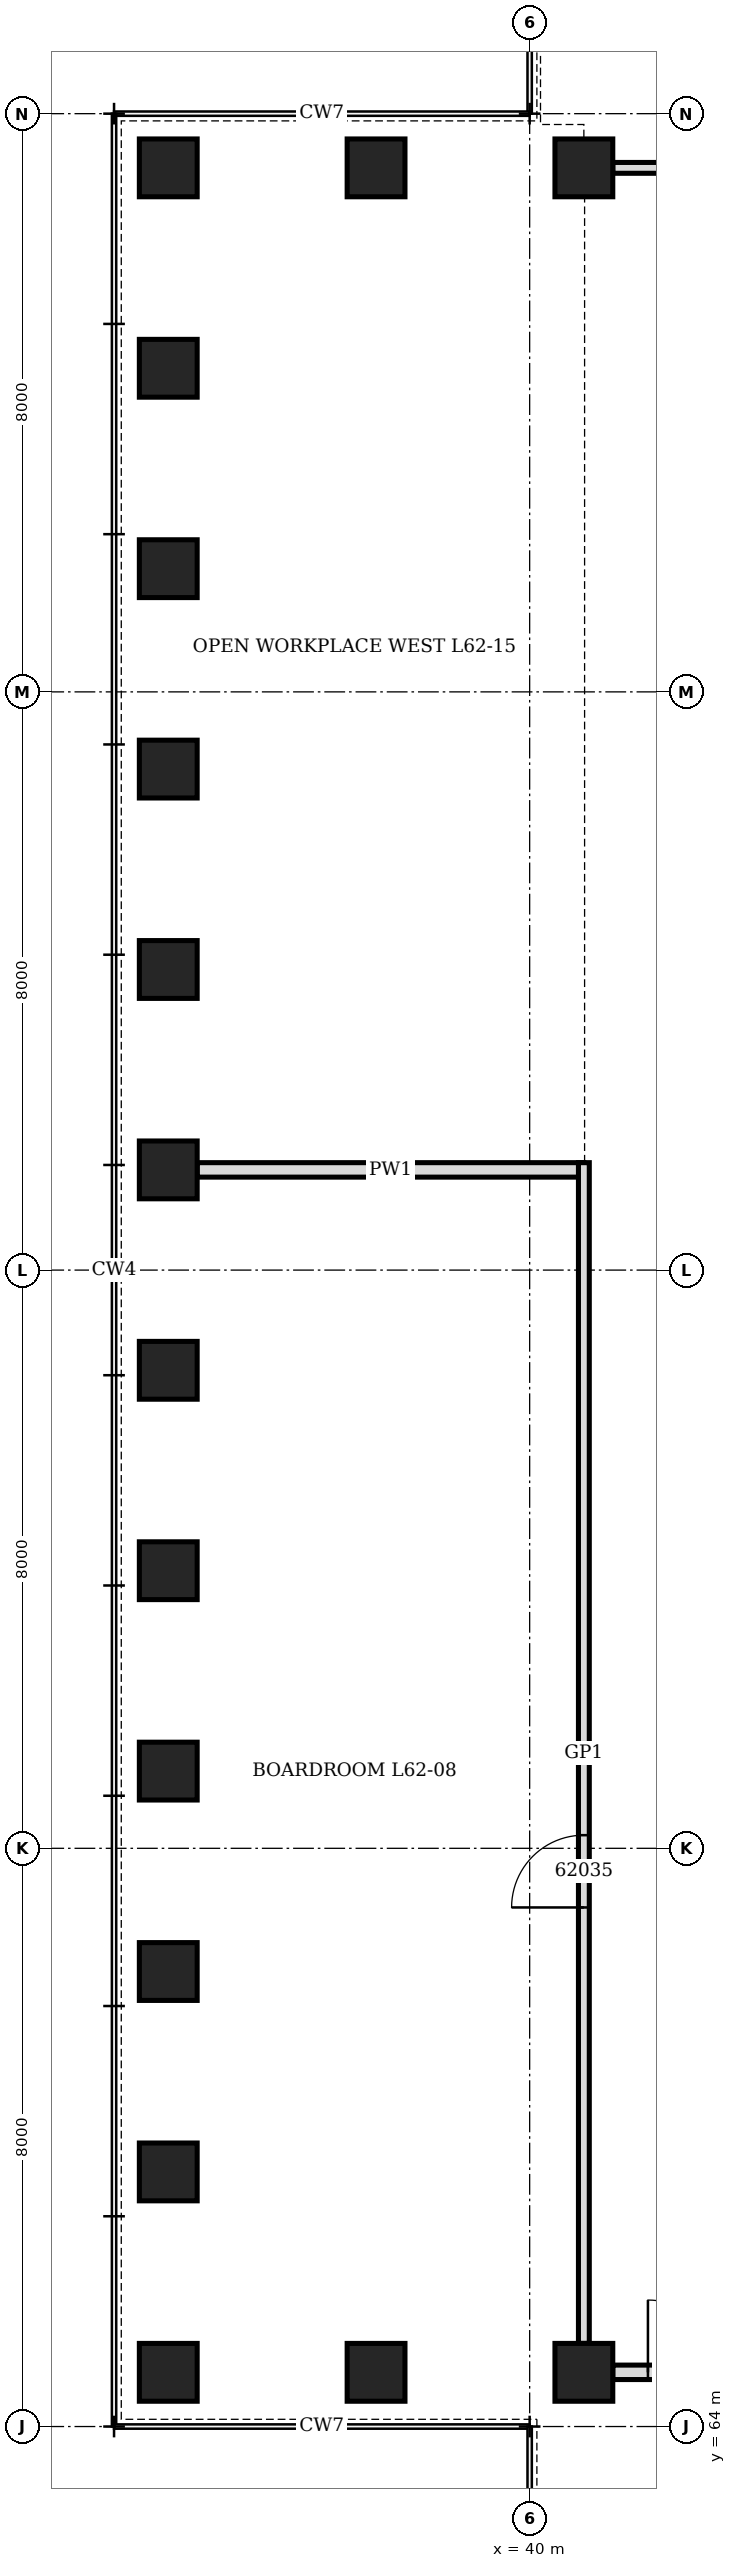
"""IFC4 building model, lengths in metres.
Left out: names, types, materials, properties, quantities, classifications, styles, units other than length and angle.
Written with IfcOpenShell. Run it as: python <this file> out.ifc"""

import sys

from ifc_helpers import new_model, si_unit, direction, frame, frame_2d, origin, origin_2d, place, context, subcontext, project, spatial, rectangle, hollow_rectangle, extrude, element, fill, save


model = new_model("IFC4")
c1 = context("Model", 3, precision=1e-05, world=origin(), true_north=direction((0.0, 1.0)))
c2 = subcontext(c1, "Body", "Model", "MODEL_VIEW")
j1 = project(units=[si_unit("LENGTHUNIT", "METRE"), si_unit("PLANEANGLEUNIT", "RADIAN")], contexts=[c1])
p1 = place(None, origin())
s1 = spatial("IfcSite", under=j1, at=p1, CompositionType="ELEMENT")
p2 = place(p1, origin())
s2 = spatial("IfcBuilding", under=s1, at=p2, CompositionType="ELEMENT")
p3 = place(p2, frame((0.0, 0.0, 275.5)))
s3 = spatial("IfcBuildingStorey", under=s2, at=p3, CompositionType="ELEMENT", Elevation=275.5)
for number, where, z_axis, x_axis in (
    (1, (40.75, 95.25, 0.0), (0.0, 0.0, 1.0), (1.0, 0.0, 0.0)),
    (2, (37.875, 95.25, 0.0), (0.0, 0.0, 1.0), (1.0, 0.0, 0.0)),
    (3, (35.0, 95.25, 0.0), (0.0, 0.0, 1.0), (0.0, 1.0, 0.0)),
    (4, (35.0, 92.477, 0.0), (0.0, 0.0, 1.0), (0.0, 1.0, 0.0)),
    (5, (35.0, 89.705, 0.0), (0.0, 0.0, 1.0), (0.0, 1.0, 0.0)),
    (6, (35.0, 86.932, 0.0), (0.0, 0.0, 1.0), (0.0, 1.0, 0.0)),
    (7, (35.0, 84.159, 0.0), (0.0, 0.0, 1.0), (0.0, 1.0, 0.0)),
    (8, (35.0, 81.386, 0.0), (0.0, 0.0, 1.0), (0.0, 1.0, 0.0)),
    (9, (35.0, 78.614, 0.0), (0.0, 0.0, 1.0), (0.0, 1.0, 0.0)),
    (10, (35.0, 75.841, 0.0), (0.0, 0.0, 1.0), (0.0, 1.0, 0.0)),
    (11, (35.0, 73.068, 0.0), (0.0, 0.0, 1.0), (0.0, 1.0, 0.0)),
    (12, (35.0, 70.295, 0.0), (0.0, 0.0, 1.0), (0.0, 1.0, 0.0)),
    (13, (35.0, 67.523, 0.0), (0.0, 0.0, 1.0), (0.0, 1.0, 0.0)),
    (14, (35.0, 64.75, 0.0), (0.0, 0.0, 1.0), (1.0, 0.0, 0.0)),
    (15, (37.875, 64.75, 0.0), (0.0, 0.0, 1.0), (1.0, 0.0, 0.0)),
    (16, (40.75, 64.75, 0.0), (0.0, 0.0, 1.0), (0.0, 1.0, 0.0)),
):
    element("IfcColumn", number, at=place(p3, frame(where, z_axis=z_axis, x_axis=x_axis)), inside=s3, PredefinedType="COLUMN", context=c2, shape_type="SweptSolid", body=[
        extrude(hollow_rectangle(XDim=0.8, YDim=0.8, WallThickness=0.1, at=origin_2d()), origin(), (0.0, 0.0, 1.0), 3.95),
    ])
p4 = place(p3, frame((35.4, 81.386, 0.0), z_axis=(0.0, 0.0, 1.0), x_axis=(1.0, 0.0, 0.0)))
e17 = element("IfcWall", 17, at=p4, inside=s3, PredefinedType="PARTITIONING", context=c2, shape_type="SweptSolid", body=[
    extrude(rectangle(XDim=5.35, YDim=0.2, at=frame_2d((2.675, 0.0))), origin(), (0.0, 0.0, 1.0), 1.95),
])
p5 = place(p3, frame((41.15, 64.75, 0.0), z_axis=(0.0, 0.0, 1.0), x_axis=(1.0, 0.0, 0.0)))
e18 = element("IfcWall", 18, at=p5, inside=s3, PredefinedType="PARTITIONING", context=c2, shape_type="SweptSolid", body=[
    extrude(rectangle(XDim=5.146, YDim=0.2, at=frame_2d((2.573, 0.0))), origin(), (0.0, 0.0, 1.0), 2.45),
])
p6 = place(p5, frame((0.486, 0.0, 0.0)))
e19 = element("IfcOpeningElement", 19, at=p6, cuts=e18, PredefinedType="OPENING", context=c2, shape_type="SweptSolid", body=[
    extrude(rectangle(XDim=1.0, YDim=2.1, at=frame_2d((0.5, 1.05))), frame((0.0, 0.11, 0.0), z_axis=(0.0, -1.0, 0.0), x_axis=(1.0, 0.0, 0.0)), (0.0, 0.0, 1.0), 0.22),
])
p7 = place(p3, frame((41.15, 95.25, 0.0), z_axis=(0.0, 0.0, 1.0), x_axis=(1.0, 0.0, 0.0)))
e20 = element("IfcWall", 20, at=p7, inside=s3, PredefinedType="PARTITIONING", context=c2, shape_type="SweptSolid", body=[
    extrude(rectangle(XDim=10.791, YDim=0.15, at=frame_2d((5.396, 0.0))), origin(), (0.0, 0.0, 1.0), 2.45),
])
p8 = place(p7, frame((3.259, 0.0, 0.0)))
e21 = element("IfcOpeningElement", 21, at=p8, cuts=e20, PredefinedType="OPENING", context=c2, shape_type="SweptSolid", body=[
    extrude(rectangle(XDim=1.0, YDim=2.4, at=frame_2d((0.5, 1.2))), frame((0.0, 0.085, 0.0), z_axis=(0.0, -1.0, 0.0), x_axis=(1.0, 0.0, 0.0)), (0.0, 0.0, 1.0), 0.17),
])
p9 = place(p3, frame((40.75, 65.15, 0.0), z_axis=(0.0, 0.0, 1.0), x_axis=(0.0, 1.0, 0.0)))
e22 = element("IfcWall", 22, at=p9, inside=s3, PredefinedType="PARTITIONING", context=c2, shape_type="SweptSolid", body=[
    extrude(rectangle(XDim=16.336, YDim=0.15, at=frame_2d((8.168, 0.0))), origin(), (0.0, 0.0, 1.0), 2.45),
])
p10 = place(p9, frame((6.032, 0.0, 0.0)))
e23 = element("IfcOpeningElement", 23, at=p10, cuts=e22, PredefinedType="OPENING", context=c2, shape_type="SweptSolid", body=[
    extrude(rectangle(XDim=1.0, YDim=2.4, at=frame_2d((0.5, 1.2))), frame((0.0, 0.085, 0.0), z_axis=(0.0, -1.0, 0.0), x_axis=(1.0, 0.0, 0.0)), (0.0, 0.0, 1.0), 0.17),
])
p11 = place(p6, origin())
e24 = element("IfcDoor", 24, at=p11, inside=s3, OperationType="SINGLE_SWING_LEFT", PredefinedType="DOOR", context=c2, shape_type="SweptSolid", body=[
    extrude(rectangle(XDim=1.0, YDim=2.1, at=frame_2d((0.5, 1.05))), frame((0.0, 0.1, 0.0), z_axis=(0.0, -1.0, 0.0), x_axis=(1.0, 0.0, 0.0)), (0.0, 0.0, 1.0), 0.199),
])
fill(e19, e24)
p12 = place(p10, origin())
e25 = element("IfcDoor", 25, at=p12, inside=s3, OperationType="SINGLE_SWING_RIGHT", PredefinedType="DOOR", context=c2, shape_type="SweptSolid", body=[
    extrude(rectangle(XDim=1.0, YDim=2.4, at=frame_2d((0.5, 1.2))), frame((0.0, 0.075, 0.0), z_axis=(0.0, -1.0, 0.0), x_axis=(1.0, 0.0, 0.0)), (0.0, 0.0, 1.0), 0.149),
])
fill(e23, e25)
save(model, sys.argv[1])
